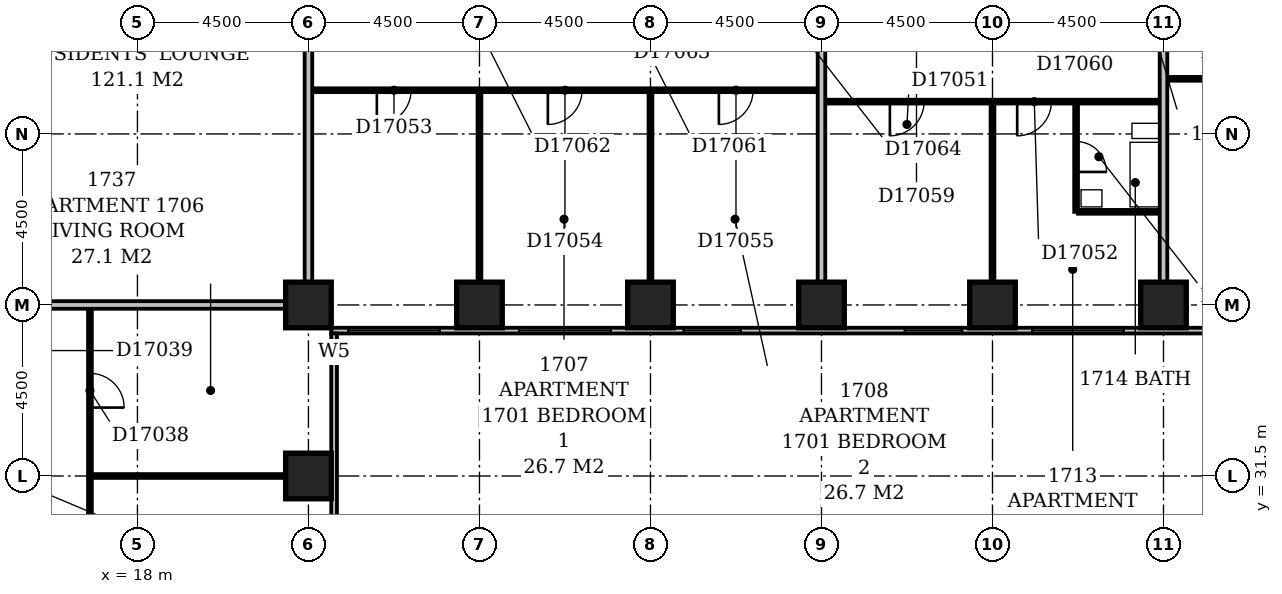
"""IFC4 building model, lengths in metres.
Left out: names, types, materials, properties, quantities, classifications, styles, units other than length and angle.
Written with IfcOpenShell. Run it as: python <this file> out.ifc"""

import sys

from ifc_helpers import new_model, si_unit, direction, frame, frame_2d, origin, origin_2d, place, context, subcontext, project, spatial, rectangle, extrude, element, fill, save


model = new_model("IFC4")
c1 = context("Model", 3, precision=1e-05, world=origin(), true_north=direction((0.0, 1.0)))
c2 = subcontext(c1, "Body", "Model", "MODEL_VIEW")
j1 = project(units=[si_unit("LENGTHUNIT", "METRE"), si_unit("PLANEANGLEUNIT", "RADIAN")], contexts=[c1])
p1 = place(None, origin())
s1 = spatial("IfcSite", under=j1, at=p1, CompositionType="ELEMENT")
p2 = place(p1, origin())
s2 = spatial("IfcBuilding", under=s1, at=p2, CompositionType="ELEMENT")
p3 = place(p2, frame((0.0, 0.0, 72.2)))
s3 = spatial("IfcBuildingStorey", under=s2, at=p3, CompositionType="ELEMENT", Elevation=72.2)
for number, where, z_axis, x_axis in (
    (1, (22.5, 31.5, -0.3), (0.0, 0.0, 1.0), (1.0, 0.0, 0.0)),
    (2, (22.5, 36.0, -0.3), (0.0, 0.0, 1.0), (1.0, 0.0, 0.0)),
    (3, (27.0, 36.0, -0.3), (0.0, 0.0, 1.0), (1.0, 0.0, 0.0)),
    (4, (31.5, 36.0, -0.3), (0.0, 0.0, 1.0), (1.0, 0.0, 0.0)),
    (5, (36.0, 36.0, -0.3), (0.0, 0.0, 1.0), (1.0, 0.0, 0.0)),
    (6, (40.5, 36.0, -0.3), (0.0, 0.0, 1.0), (1.0, 0.0, 0.0)),
    (7, (45.0, 36.0, -0.3), (0.0, 0.0, 1.0), (1.0, 0.0, 0.0)),
):
    element("IfcColumn", number, at=place(p3, frame(where, z_axis=z_axis, x_axis=x_axis)), inside=s3, PredefinedType="COLUMN", context=c2, shape_type="SweptSolid", body=[
        extrude(rectangle(XDim=1.2, YDim=1.2, at=origin_2d()), origin(), (0.0, 0.0, 1.0), 3.6),
    ])
p4 = place(p3, frame((23.175, 17.4, 0.0), z_axis=(0.0, 0.0, 1.0), x_axis=(0.0, 1.0, 0.0)))
e8 = element("IfcWall", 8, at=p4, inside=s3, PredefinedType="STANDARD", context=c2, shape_type="SweptSolid", body=[
    extrude(rectangle(XDim=17.85, YDim=0.15, at=frame_2d((8.925, 0.0))), origin(), (0.0, 0.0, 1.0), 2.7),
])
p5 = place(p4, frame((1.65, 0.0, 0.6)))
e9 = element("IfcOpeningElement", 9, at=p5, cuts=e8, PredefinedType="OPENING", context=c2, shape_type="SweptSolid", body=[
    extrude(rectangle(XDim=2.4, YDim=1.8, at=frame_2d((1.2, 0.9))), frame((0.0, 0.087, 0.0), z_axis=(0.0, -1.0, 0.0), x_axis=(1.0, 0.0, 0.0)), (0.0, 0.0, 1.0), 0.174),
])
p6 = place(p4, frame((6.15, 0.0, 0.6)))
e10 = element("IfcOpeningElement", 10, at=p6, cuts=e8, PredefinedType="OPENING", context=c2, shape_type="SweptSolid", body=[
    extrude(rectangle(XDim=2.4, YDim=1.8, at=frame_2d((1.2, 0.9))), frame((0.0, 0.087, 0.0), z_axis=(0.0, -1.0, 0.0), x_axis=(1.0, 0.0, 0.0)), (0.0, 0.0, 1.0), 0.174),
])
p7 = place(p4, frame((10.65, 0.0, 0.6)))
e11 = element("IfcOpeningElement", 11, at=p7, cuts=e8, PredefinedType="OPENING", context=c2, shape_type="SweptSolid", body=[
    extrude(rectangle(XDim=2.4, YDim=1.8, at=frame_2d((1.2, 0.9))), frame((0.0, 0.087, 0.0), z_axis=(0.0, -1.0, 0.0), x_axis=(1.0, 0.0, 0.0)), (0.0, 0.0, 1.0), 0.174),
])
p8 = place(p4, frame((17.13, 0.0, 0.6)))
e12 = element("IfcOpeningElement", 12, at=p8, cuts=e8, PredefinedType="OPENING", context=c2, shape_type="SweptSolid", body=[
    extrude(rectangle(XDim=0.45, YDim=1.8, at=frame_2d((0.225, 0.9))), frame((0.0, 0.087, 0.0), z_axis=(0.0, -1.0, 0.0), x_axis=(1.0, 0.0, 0.0)), (0.0, 0.0, 1.0), 0.174),
])
p9 = place(p3, frame((23.1, 35.325, 0.0), z_axis=(0.0, 0.0, 1.0), x_axis=(1.0, 0.0, 0.0)))
e13 = element("IfcWall", 13, at=p9, inside=s3, PredefinedType="STANDARD", context=c2, shape_type="SweptSolid", body=[
    extrude(rectangle(XDim=45.15, YDim=0.15, at=frame_2d((22.575, 0.0))), origin(), (0.0, 0.0, 1.0), 2.7),
])
p10 = place(p9, frame((0.45, 0.0, 0.6)))
e14 = element("IfcOpeningElement", 14, at=p10, cuts=e13, PredefinedType="OPENING", context=c2, shape_type="SweptSolid", body=[
    extrude(rectangle(XDim=2.4, YDim=1.8, at=frame_2d((1.2, 0.9))), frame((0.0, 0.087, 0.0), z_axis=(0.0, -1.0, 0.0), x_axis=(1.0, 0.0, 0.0)), (0.0, 0.0, 1.0), 0.174),
])
p11 = place(p9, frame((4.95, 0.0, 0.6)))
e15 = element("IfcOpeningElement", 15, at=p11, cuts=e13, PredefinedType="OPENING", context=c2, shape_type="SweptSolid", body=[
    extrude(rectangle(XDim=2.4, YDim=1.8, at=frame_2d((1.2, 0.9))), frame((0.0, 0.087, 0.0), z_axis=(0.0, -1.0, 0.0), x_axis=(1.0, 0.0, 0.0)), (0.0, 0.0, 1.0), 0.174),
])
p12 = place(p9, frame((9.275, 0.0, 0.6)))
e16 = element("IfcOpeningElement", 16, at=p12, cuts=e13, PredefinedType="OPENING", context=c2, shape_type="SweptSolid", body=[
    extrude(rectangle(XDim=1.5, YDim=1.8, at=frame_2d((0.75, 0.9))), frame((0.0, 0.087, 0.0), z_axis=(0.0, -1.0, 0.0), x_axis=(1.0, 0.0, 0.0)), (0.0, 0.0, 1.0), 0.174),
])
p13 = place(p9, frame((15.097, 0.0, 0.6)))
e17 = element("IfcOpeningElement", 17, at=p13, cuts=e13, PredefinedType="OPENING", context=c2, shape_type="SweptSolid", body=[
    extrude(rectangle(XDim=1.5, YDim=1.8, at=frame_2d((0.75, 0.9))), frame((0.0, 0.087, 0.0), z_axis=(0.0, -1.0, 0.0), x_axis=(1.0, 0.0, 0.0)), (0.0, 0.0, 1.0), 0.174),
])
p14 = place(p9, frame((18.45, 0.0, 0.6)))
e18 = element("IfcOpeningElement", 18, at=p14, cuts=e13, PredefinedType="OPENING", context=c2, shape_type="SweptSolid", body=[
    extrude(rectangle(XDim=2.4, YDim=1.8, at=frame_2d((1.2, 0.9))), frame((0.0, 0.087, 0.0), z_axis=(0.0, -1.0, 0.0), x_axis=(1.0, 0.0, 0.0)), (0.0, 0.0, 1.0), 0.174),
])
p15 = place(p9, frame((22.95, 0.0, 0.6)))
e19 = element("IfcOpeningElement", 19, at=p15, cuts=e13, PredefinedType="OPENING", context=c2, shape_type="SweptSolid", body=[
    extrude(rectangle(XDim=2.4, YDim=1.8, at=frame_2d((1.2, 0.9))), frame((0.0, 0.087, 0.0), z_axis=(0.0, -1.0, 0.0), x_axis=(1.0, 0.0, 0.0)), (0.0, 0.0, 1.0), 0.174),
])
p16 = place(p9, frame((27.45, 0.0, 0.6)))
e20 = element("IfcOpeningElement", 20, at=p16, cuts=e13, PredefinedType="OPENING", context=c2, shape_type="SweptSolid", body=[
    extrude(rectangle(XDim=2.4, YDim=1.8, at=frame_2d((1.2, 0.9))), frame((0.0, 0.087, 0.0), z_axis=(0.0, -1.0, 0.0), x_axis=(1.0, 0.0, 0.0)), (0.0, 0.0, 1.0), 0.174),
])
p17 = place(p9, frame((31.95, 0.0, 0.6)))
e21 = element("IfcOpeningElement", 21, at=p17, cuts=e13, PredefinedType="OPENING", context=c2, shape_type="SweptSolid", body=[
    extrude(rectangle(XDim=2.4, YDim=1.8, at=frame_2d((1.2, 0.9))), frame((0.0, 0.087, 0.0), z_axis=(0.0, -1.0, 0.0), x_axis=(1.0, 0.0, 0.0)), (0.0, 0.0, 1.0), 0.174),
])
p18 = place(p9, frame((36.45, 0.0, 0.6)))
e22 = element("IfcOpeningElement", 22, at=p18, cuts=e13, PredefinedType="OPENING", context=c2, shape_type="SweptSolid", body=[
    extrude(rectangle(XDim=2.4, YDim=1.8, at=frame_2d((1.2, 0.9))), frame((0.0, 0.087, 0.0), z_axis=(0.0, -1.0, 0.0), x_axis=(1.0, 0.0, 0.0)), (0.0, 0.0, 1.0), 0.174),
])
p19 = place(p9, frame((40.831, 0.0, 0.6)))
e23 = element("IfcOpeningElement", 23, at=p19, cuts=e13, PredefinedType="OPENING", context=c2, shape_type="SweptSolid", body=[
    extrude(rectangle(XDim=0.6, YDim=1.8, at=frame_2d((0.3, 0.9))), frame((0.0, 0.087, 0.0), z_axis=(0.0, -1.0, 0.0), x_axis=(1.0, 0.0, 0.0)), (0.0, 0.0, 1.0), 0.174),
])
p20 = place(p3, frame((16.75, 27.1, 0.0), z_axis=(0.0, 0.0, 1.0), x_axis=(0.0, 1.0, 0.0)))
e24 = element("IfcWall", 24, at=p20, inside=s3, PredefinedType="PARTITIONING", context=c2, shape_type="SweptSolid", body=[
    extrude(rectangle(XDim=8.8, YDim=0.1, at=frame_2d((4.4, 0.0))), origin(), (0.0, 0.0, 1.0), 3.3),
])
p21 = place(p20, frame((1.7, 0.0, 0.0)))
e25 = element("IfcOpeningElement", 25, at=p21, cuts=e24, PredefinedType="OPENING", context=c2, shape_type="SweptSolid", body=[
    extrude(rectangle(XDim=0.9, YDim=2.1, at=frame_2d((0.45, 1.05))), frame((0.0, 0.062, 0.0), z_axis=(0.0, -1.0, 0.0), x_axis=(1.0, 0.0, 0.0)), (0.0, 0.0, 1.0), 0.124),
])
p22 = place(p20, frame((6.2, 0.0, 0.0)))
e26 = element("IfcOpeningElement", 26, at=p22, cuts=e24, PredefinedType="OPENING", context=c2, shape_type="SweptSolid", body=[
    extrude(rectangle(XDim=0.9, YDim=2.1, at=frame_2d((0.45, 1.05))), frame((0.0, 0.062, 0.0), z_axis=(0.0, -1.0, 0.0), x_axis=(1.0, 0.0, 0.0)), (0.0, 0.0, 1.0), 0.124),
])
p23 = place(p3, frame((16.8, 31.5, 0.0), z_axis=(0.0, 0.0, 1.0), x_axis=(1.0, 0.0, 0.0)))
e27 = element("IfcWall", 27, at=p23, inside=s3, PredefinedType="PARTITIONING", context=c2, shape_type="SweptSolid", body=[
    extrude(rectangle(XDim=5.1, YDim=0.1, at=frame_2d((2.55, 0.0))), origin(), (0.0, 0.0, 1.0), 3.3),
])
p24 = place(p3, frame((9.1, 36.0, 0.0), z_axis=(0.0, 0.0, 1.0), x_axis=(1.0, 0.0, 0.0)))
e28 = element("IfcWall", 28, at=p24, inside=s3, PredefinedType="PARTITIONING", context=c2, shape_type="SweptSolid", body=[
    extrude(rectangle(XDim=12.8, YDim=0.2, at=frame_2d((6.4, 0.0))), origin(), (0.0, 0.0, 1.0), 2.4),
])
p25 = place(p3, frame((22.5, 36.6, 0.0), z_axis=(0.0, 0.0, 1.0), x_axis=(0.0, 1.0, 0.0)))
e29 = element("IfcWall", 29, at=p25, inside=s3, PredefinedType="PARTITIONING", context=c2, shape_type="SweptSolid", body=[
    extrude(rectangle(XDim=12.8, YDim=0.2, at=frame_2d((6.4, 0.0))), origin(), (0.0, 0.0, 1.0), 3.3),
])
p26 = place(p3, frame((27.0, 36.6, 0.0), z_axis=(0.0, 0.0, 1.0), x_axis=(0.0, 1.0, 0.0)))
e30 = element("IfcWall", 30, at=p26, inside=s3, PredefinedType="PARTITIONING", context=c2, shape_type="SweptSolid", body=[
    extrude(rectangle(XDim=5.0, YDim=0.1, at=frame_2d((2.5, 0.0))), origin(), (0.0, 0.0, 1.0), 2.6),
])
p27 = place(p3, frame((31.5, 36.6, 0.0), z_axis=(0.0, 0.0, 1.0), x_axis=(0.0, 1.0, 0.0)))
e31 = element("IfcWall", 31, at=p27, inside=s3, PredefinedType="PARTITIONING", context=c2, shape_type="SweptSolid", body=[
    extrude(rectangle(XDim=5.0, YDim=0.1, at=frame_2d((2.5, 0.0))), origin(), (0.0, 0.0, 1.0), 3.3),
])
p28 = place(p3, frame((36.0, 36.6, 0.0), z_axis=(0.0, 0.0, 1.0), x_axis=(0.0, 1.0, 0.0)))
e32 = element("IfcWall", 32, at=p28, inside=s3, PredefinedType="PARTITIONING", context=c2, shape_type="SweptSolid", body=[
    extrude(rectangle(XDim=12.8, YDim=0.2, at=frame_2d((6.4, 0.0))), origin(), (0.0, 0.0, 1.0), 2.4),
])
p29 = place(p3, frame((40.5, 36.6, 0.0), z_axis=(0.0, 0.0, 1.0), x_axis=(0.0, 1.0, 0.0)))
e33 = element("IfcWall", 33, at=p29, inside=s3, PredefinedType="PARTITIONING", context=c2, shape_type="SweptSolid", body=[
    extrude(rectangle(XDim=4.7, YDim=0.1, at=frame_2d((2.35, 0.0))), origin(), (0.0, 0.0, 1.0), 3.3),
])
p30 = place(p3, frame((45.0, 36.6, 0.0), z_axis=(0.0, 0.0, 1.0), x_axis=(0.0, 1.0, 0.0)))
e34 = element("IfcWall", 34, at=p30, inside=s3, PredefinedType="PARTITIONING", context=c2, shape_type="SweptSolid", body=[
    extrude(rectangle(XDim=12.8, YDim=0.2, at=frame_2d((6.4, 0.0))), origin(), (0.0, 0.0, 1.0), 2.6),
])
p31 = place(p3, frame((42.7, 38.45, 0.0), z_axis=(0.0, 0.0, 1.0), x_axis=(0.0, 1.0, 0.0)))
e35 = element("IfcWall", 35, at=p31, inside=s3, PredefinedType="PLUMBINGWALL", context=c2, shape_type="SweptSolid", body=[
    extrude(rectangle(XDim=2.85, YDim=0.1, at=frame_2d((1.425, 0.0))), origin(), (0.0, 0.0, 1.0), 3.3),
])
p32 = place(p31, frame((1.05, 0.0, 0.0)))
e36 = element("IfcOpeningElement", 36, at=p32, cuts=e35, PredefinedType="OPENING", context=c2, shape_type="SweptSolid", body=[
    extrude(rectangle(XDim=0.8, YDim=2.1, at=frame_2d((0.4, 1.05))), frame((0.0, 0.062, 0.0), z_axis=(0.0, -1.0, 0.0), x_axis=(1.0, 0.0, 0.0)), (0.0, 0.0, 1.0), 0.124),
])
p33 = place(p3, frame((42.75, 38.45, 0.0), z_axis=(0.0, 0.0, 1.0), x_axis=(1.0, 0.0, 0.0)))
e37 = element("IfcWall", 37, at=p33, inside=s3, PredefinedType="PLUMBINGWALL", context=c2, shape_type="SweptSolid", body=[
    extrude(rectangle(XDim=2.15, YDim=0.1, at=frame_2d((1.075, 0.0))), origin(), (0.0, 0.0, 1.0), 3.3),
])
p34 = place(p3, frame((36.1, 41.35, 0.0), z_axis=(0.0, 0.0, 1.0), x_axis=(1.0, 0.0, 0.0)))
e38 = element("IfcWall", 38, at=p34, inside=s3, PredefinedType="PARTITIONING", context=c2, shape_type="SweptSolid", body=[
    extrude(rectangle(XDim=8.8, YDim=0.1, at=frame_2d((4.4, 0.0))), origin(), (0.0, 0.0, 1.0), 3.3),
])
p35 = place(p34, frame((1.7, 0.0, 0.0)))
e39 = element("IfcOpeningElement", 39, at=p35, cuts=e38, PredefinedType="OPENING", context=c2, shape_type="SweptSolid", body=[
    extrude(rectangle(XDim=0.9, YDim=2.1, at=frame_2d((0.45, 1.05))), frame((0.0, 0.062, 0.0), z_axis=(0.0, -1.0, 0.0), x_axis=(1.0, 0.0, 0.0)), (0.0, 0.0, 1.0), 0.124),
])
p36 = place(p34, frame((5.05, 0.0, 0.0)))
e40 = element("IfcOpeningElement", 40, at=p36, cuts=e38, PredefinedType="OPENING", context=c2, shape_type="SweptSolid", body=[
    extrude(rectangle(XDim=0.9, YDim=2.1, at=frame_2d((0.45, 1.05))), frame((0.0, 0.062, 0.0), z_axis=(0.0, -1.0, 0.0), x_axis=(1.0, 0.0, 0.0)), (0.0, 0.0, 1.0), 0.124),
])
p37 = place(p3, frame((22.6, 41.65, 0.0), z_axis=(0.0, 0.0, 1.0), x_axis=(1.0, 0.0, 0.0)))
e41 = element("IfcWall", 41, at=p37, inside=s3, PredefinedType="PARTITIONING", context=c2, shape_type="SweptSolid", body=[
    extrude(rectangle(XDim=13.3, YDim=0.1, at=frame_2d((6.65, 0.0))), origin(), (0.0, 0.0, 1.0), 3.3),
])
p38 = place(p37, frame((1.7, 0.0, 0.0)))
e42 = element("IfcOpeningElement", 42, at=p38, cuts=e41, PredefinedType="OPENING", context=c2, shape_type="SweptSolid", body=[
    extrude(rectangle(XDim=0.9, YDim=2.1, at=frame_2d((0.45, 1.05))), frame((0.0, 0.062, 0.0), z_axis=(0.0, -1.0, 0.0), x_axis=(1.0, 0.0, 0.0)), (0.0, 0.0, 1.0), 0.124),
])
p39 = place(p37, frame((6.2, 0.0, 0.0)))
e43 = element("IfcOpeningElement", 43, at=p39, cuts=e41, PredefinedType="OPENING", context=c2, shape_type="SweptSolid", body=[
    extrude(rectangle(XDim=0.9, YDim=2.1, at=frame_2d((0.45, 1.05))), frame((0.0, 0.062, 0.0), z_axis=(0.0, -1.0, 0.0), x_axis=(1.0, 0.0, 0.0)), (0.0, 0.0, 1.0), 0.124),
])
p40 = place(p37, frame((10.7, 0.0, 0.0)))
e44 = element("IfcOpeningElement", 44, at=p40, cuts=e41, PredefinedType="OPENING", context=c2, shape_type="SweptSolid", body=[
    extrude(rectangle(XDim=0.9, YDim=2.1, at=frame_2d((0.45, 1.05))), frame((0.0, 0.062, 0.0), z_axis=(0.0, -1.0, 0.0), x_axis=(1.0, 0.0, 0.0)), (0.0, 0.0, 1.0), 0.124),
])
p41 = place(p3, frame((45.1, 41.95, 0.0), z_axis=(0.0, 0.0, 1.0), x_axis=(1.0, 0.0, 0.0)))
e45 = element("IfcWall", 45, at=p41, inside=s3, PredefinedType="PARTITIONING", context=c2, shape_type="SweptSolid", body=[
    extrude(rectangle(XDim=4.3, YDim=0.1, at=frame_2d((2.15, 0.0))), origin(), (0.0, 0.0, 1.0), 3.3),
])
p42 = place(p41, frame((1.7, 0.0, 0.0)))
e46 = element("IfcOpeningElement", 46, at=p42, cuts=e45, PredefinedType="OPENING", context=c2, shape_type="SweptSolid", body=[
    extrude(rectangle(XDim=0.9, YDim=2.1, at=frame_2d((0.45, 1.05))), frame((0.0, 0.062, 0.0), z_axis=(0.0, -1.0, 0.0), x_axis=(1.0, 0.0, 0.0)), (0.0, 0.0, 1.0), 0.124),
])
p43 = place(p8, origin())
e47 = element("IfcWindow", 47, at=p43, inside=s3, PartitioningType="SINGLE_PANEL", PredefinedType="WINDOW", context=c2, shape_type="SweptSolid", body=[
    extrude(rectangle(XDim=0.45, YDim=1.8, at=frame_2d((0.225, 0.9))), frame((0.0, 0.03, 0.0), z_axis=(0.0, -1.0, 0.0), x_axis=(1.0, 0.0, 0.0)), (0.0, 0.0, 1.0), 0.06),
])
fill(e12, e47)
p44 = place(p10, origin())
e48 = element("IfcWindow", 48, at=p44, inside=s3, PartitioningType="SINGLE_PANEL", PredefinedType="WINDOW", context=c2, shape_type="SweptSolid", body=[
    extrude(rectangle(XDim=2.4, YDim=1.8, at=frame_2d((1.2, 0.9))), frame((0.0, 0.03, 0.0), z_axis=(0.0, -1.0, 0.0), x_axis=(1.0, 0.0, 0.0)), (0.0, 0.0, 1.0), 0.06),
])
fill(e14, e48)
p45 = place(p11, origin())
e49 = element("IfcWindow", 49, at=p45, inside=s3, PartitioningType="SINGLE_PANEL", PredefinedType="WINDOW", context=c2, shape_type="SweptSolid", body=[
    extrude(rectangle(XDim=2.4, YDim=1.8, at=frame_2d((1.2, 0.9))), frame((0.0, 0.03, 0.0), z_axis=(0.0, -1.0, 0.0), x_axis=(1.0, 0.0, 0.0)), (0.0, 0.0, 1.0), 0.06),
])
fill(e15, e49)
p46 = place(p12, origin())
e50 = element("IfcWindow", 50, at=p46, inside=s3, PartitioningType="SINGLE_PANEL", PredefinedType="WINDOW", context=c2, shape_type="SweptSolid", body=[
    extrude(rectangle(XDim=1.5, YDim=1.8, at=frame_2d((0.75, 0.9))), frame((0.0, 0.03, 0.0), z_axis=(0.0, -1.0, 0.0), x_axis=(1.0, 0.0, 0.0)), (0.0, 0.0, 1.0), 0.06),
])
fill(e16, e50)
p47 = place(p13, origin())
e51 = element("IfcWindow", 51, at=p47, inside=s3, PartitioningType="SINGLE_PANEL", PredefinedType="WINDOW", context=c2, shape_type="SweptSolid", body=[
    extrude(rectangle(XDim=1.5, YDim=1.8, at=frame_2d((0.75, 0.9))), frame((0.0, 0.03, 0.0), z_axis=(0.0, -1.0, 0.0), x_axis=(1.0, 0.0, 0.0)), (0.0, 0.0, 1.0), 0.06),
])
fill(e17, e51)
p48 = place(p14, origin())
e52 = element("IfcWindow", 52, at=p48, inside=s3, PartitioningType="SINGLE_PANEL", PredefinedType="WINDOW", context=c2, shape_type="SweptSolid", body=[
    extrude(rectangle(XDim=2.4, YDim=1.8, at=frame_2d((1.2, 0.9))), frame((0.0, 0.03, 0.0), z_axis=(0.0, -1.0, 0.0), x_axis=(1.0, 0.0, 0.0)), (0.0, 0.0, 1.0), 0.06),
])
fill(e18, e52)
p49 = place(p22, frame((0.9, 0.0, 0.0), z_axis=(0.0, 0.0, 1.0), x_axis=(-1.0, 0.0, 0.0)))
e53 = element("IfcDoor", 53, at=p49, inside=s3, OperationType="SINGLE_SWING_RIGHT", PredefinedType="DOOR", context=c2, shape_type="SweptSolid", body=[
    extrude(rectangle(XDim=0.9, YDim=2.1, at=frame_2d((0.45, 1.05))), frame((0.0, 0.025, 0.0), z_axis=(0.0, -1.0, 0.0), x_axis=(1.0, 0.0, 0.0)), (0.0, 0.0, 1.0), 0.05),
])
fill(e26, e53)
p50 = place(p32, frame((0.8, 0.0, 0.0), z_axis=(0.0, 0.0, 1.0), x_axis=(-1.0, 0.0, 0.0)))
e54 = element("IfcDoor", 54, at=p50, inside=s3, OperationType="SINGLE_SWING_RIGHT", PredefinedType="DOOR", context=c2, shape_type="SweptSolid", body=[
    extrude(rectangle(XDim=0.8, YDim=2.1, at=frame_2d((0.4, 1.05))), frame((0.0, 0.025, 0.0), z_axis=(0.0, -1.0, 0.0), x_axis=(1.0, 0.0, 0.0)), (0.0, 0.0, 1.0), 0.05),
])
fill(e36, e54)
p51 = place(p35, frame((0.9, 0.0, 0.0), z_axis=(0.0, 0.0, 1.0), x_axis=(-1.0, 0.0, 0.0)))
e55 = element("IfcDoor", 55, at=p51, inside=s3, OperationType="SINGLE_SWING_RIGHT", PredefinedType="DOOR", context=c2, shape_type="SweptSolid", body=[
    extrude(rectangle(XDim=0.9, YDim=2.1, at=frame_2d((0.45, 1.05))), frame((0.0, 0.025, 0.0), z_axis=(0.0, -1.0, 0.0), x_axis=(1.0, 0.0, 0.0)), (0.0, 0.0, 1.0), 0.05),
])
fill(e39, e55)
p52 = place(p36, frame((0.9, 0.0, 0.0), z_axis=(0.0, 0.0, 1.0), x_axis=(-1.0, 0.0, 0.0)))
e56 = element("IfcDoor", 56, at=p52, inside=s3, OperationType="SINGLE_SWING_RIGHT", PredefinedType="DOOR", context=c2, shape_type="SweptSolid", body=[
    extrude(rectangle(XDim=0.9, YDim=2.1, at=frame_2d((0.45, 1.05))), frame((0.0, 0.025, 0.0), z_axis=(0.0, -1.0, 0.0), x_axis=(1.0, 0.0, 0.0)), (0.0, 0.0, 1.0), 0.05),
])
fill(e40, e56)
p53 = place(p38, frame((0.9, 0.0, 0.0), z_axis=(0.0, 0.0, 1.0), x_axis=(-1.0, 0.0, 0.0)))
e57 = element("IfcDoor", 57, at=p53, inside=s3, OperationType="SINGLE_SWING_RIGHT", PredefinedType="DOOR", context=c2, shape_type="SweptSolid", body=[
    extrude(rectangle(XDim=0.9, YDim=2.1, at=frame_2d((0.45, 1.05))), frame((0.0, 0.025, 0.0), z_axis=(0.0, -1.0, 0.0), x_axis=(1.0, 0.0, 0.0)), (0.0, 0.0, 1.0), 0.05),
])
fill(e42, e57)
p54 = place(p39, frame((0.9, 0.0, 0.0), z_axis=(0.0, 0.0, 1.0), x_axis=(-1.0, 0.0, 0.0)))
e58 = element("IfcDoor", 58, at=p54, inside=s3, OperationType="SINGLE_SWING_RIGHT", PredefinedType="DOOR", context=c2, shape_type="SweptSolid", body=[
    extrude(rectangle(XDim=0.9, YDim=2.1, at=frame_2d((0.45, 1.05))), frame((0.0, 0.025, 0.0), z_axis=(0.0, -1.0, 0.0), x_axis=(1.0, 0.0, 0.0)), (0.0, 0.0, 1.0), 0.05),
])
fill(e43, e58)
p55 = place(p40, frame((0.9, 0.0, 0.0), z_axis=(0.0, 0.0, 1.0), x_axis=(-1.0, 0.0, 0.0)))
e59 = element("IfcDoor", 59, at=p55, inside=s3, OperationType="SINGLE_SWING_RIGHT", PredefinedType="DOOR", context=c2, shape_type="SweptSolid", body=[
    extrude(rectangle(XDim=0.9, YDim=2.1, at=frame_2d((0.45, 1.05))), frame((0.0, 0.025, 0.0), z_axis=(0.0, -1.0, 0.0), x_axis=(1.0, 0.0, 0.0)), (0.0, 0.0, 1.0), 0.05),
])
fill(e44, e59)
save(model, sys.argv[1])
